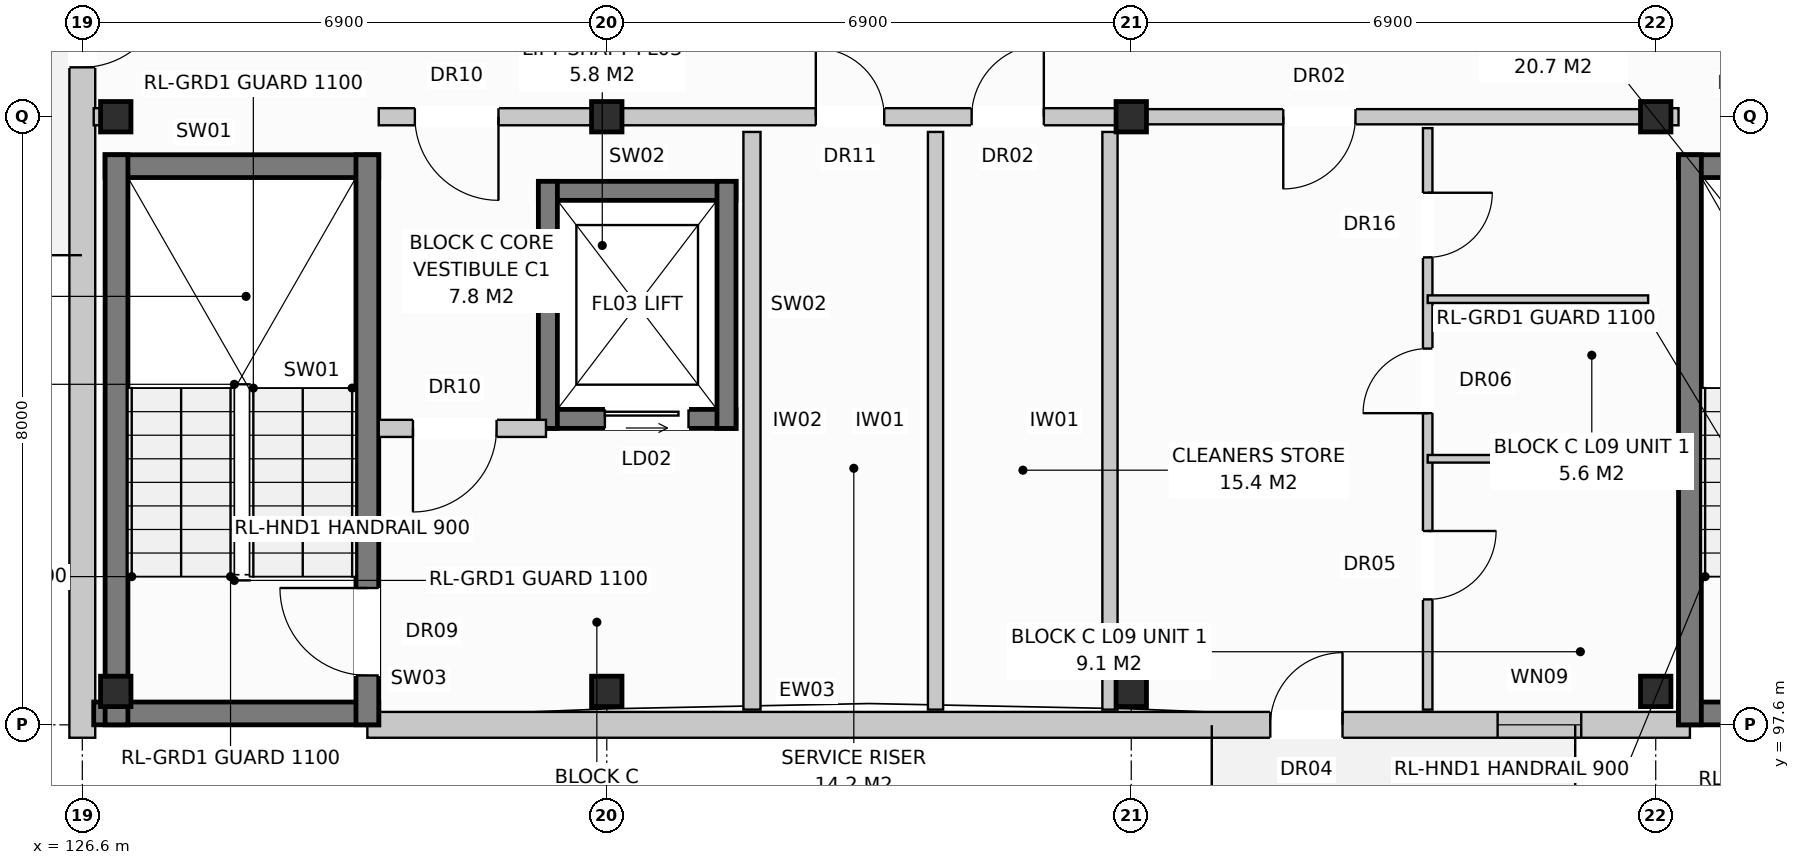
"""IFC4 building model, lengths in metres.
Left out: names, types, materials, properties, quantities, classifications, styles, units other than length and angle.
Written with IfcOpenShell. Run it as: python <this file> out.ifc"""

import sys

from ifc_helpers import new_model, si_unit, direction, frame, frame_2d, origin, origin_with_axes, origin_2d, place, context, subcontext, project, spatial, rectangle, extrude, element, fill, save


model = new_model("IFC4")
c1 = context("Model", 3, precision=1e-05, world=origin(), true_north=direction((0.0, 1.0)))
c2 = subcontext(c1, "Body", "Model", "MODEL_VIEW")
j1 = project(units=[si_unit("LENGTHUNIT", "METRE"), si_unit("PLANEANGLEUNIT", "RADIAN")], contexts=[c1])
p1 = place(None, origin())
s1 = spatial("IfcSite", under=j1, at=p1, CompositionType="ELEMENT")
p2 = place(p1, origin())
s2 = spatial("IfcBuilding", under=s1, at=p2, CompositionType="ELEMENT")
p3 = place(p2, frame((0.0, 0.0, 30.4)))
s3 = spatial("IfcBuildingStorey", under=s2, at=p3, CompositionType="ELEMENT", Elevation=30.4)
for number, where, z_axis, x_axis in (
    (1, (127.04, 98.04, 0.0), (0.0, 0.0, 1.0), (1.0, 0.0, 0.0)),
    (2, (127.04, 105.6, 0.0), (0.0, 0.0, 1.0), (1.0, 0.0, 0.0)),
    (3, (133.5, 98.04, 0.0), (0.0, 0.0, 1.0), (1.0, 0.0, 0.0)),
    (4, (133.5, 105.6, 0.0), (0.0, 0.0, 1.0), (1.0, 0.0, 0.0)),
    (5, (140.4, 98.04, 0.0), (0.0, 0.0, 1.0), (1.0, 0.0, 0.0)),
    (6, (140.4, 105.6, 0.0), (0.0, 0.0, 1.0), (1.0, 0.0, 0.0)),
    (7, (147.3, 98.04, 0.0), (0.0, 0.0, 1.0), (1.0, 0.0, 0.0)),
    (8, (147.3, 105.6, 0.0), (0.0, 0.0, 1.0), (1.0, 0.0, 0.0)),
):
    element("IfcColumn", number, at=place(p3, frame(where, z_axis=z_axis, x_axis=x_axis)), inside=s3, PredefinedType="COLUMN", context=c2, shape_type="SweptSolid", body=[
        extrude(rectangle(XDim=0.4, YDim=0.4, at=origin_2d()), origin(), (0.0, 0.0, 1.0), 3.2),
    ])
p4 = place(p3, frame((130.35, 97.6, 0.0), z_axis=(0.0, 0.0, 1.0), x_axis=(1.0, 0.0, 0.0)))
e9 = element("IfcWall", 9, at=p4, inside=s3, PredefinedType="STANDARD", context=c2, shape_type="SweptSolid", body=[
    extrude(rectangle(XDim=17.4, YDim=0.34, at=frame_2d((8.7, 0.0))), origin(), (0.0, 0.0, 1.0), 2.96),
])
p5 = place(p4, frame((11.879, 0.0, 0.0)))
e10 = element("IfcOpeningElement", 10, at=p5, cuts=e9, PredefinedType="OPENING", context=c2, shape_type="SweptSolid", body=[
    extrude(rectangle(XDim=0.95, YDim=2.1, at=frame_2d((0.475, 1.05))), frame((0.0, 0.182, 0.0), z_axis=(0.0, -1.0, 0.0), x_axis=(1.0, 0.0, 0.0)), (0.0, 0.0, 1.0), 0.364),
])
p6 = place(p4, frame((14.87, 0.0, 0.72)))
e11 = element("IfcOpeningElement", 11, at=p6, cuts=e9, PredefinedType="OPENING", context=c2, shape_type="SweptSolid", body=[
    extrude(rectangle(XDim=1.1, YDim=1.5, at=frame_2d((0.55, 0.75))), frame((0.0, 0.182, 0.0), z_axis=(0.0, -1.0, 0.0), x_axis=(1.0, 0.0, 0.0)), (0.0, 0.0, 1.0), 0.364),
])
p7 = place(p3, frame((126.6, 97.43, 0.0), z_axis=(0.0, 0.0, 1.0), x_axis=(0.0, 1.0, 0.0)))
e12 = element("IfcWall", 12, at=p7, inside=s3, PredefinedType="STANDARD", context=c2, shape_type="SweptSolid", body=[
    extrude(rectangle(XDim=18.74, YDim=0.34, at=frame_2d((9.37, 0.0))), origin(), (0.0, 0.0, 1.0), 2.96),
])
p8 = place(p7, frame((8.82, 0.0, 0.0)))
e13 = element("IfcOpeningElement", 13, at=p8, cuts=e12, PredefinedType="OPENING", context=c2, shape_type="SweptSolid", body=[
    extrude(rectangle(XDim=1.1, YDim=2.1, at=frame_2d((0.55, 1.05))), frame((0.0, 0.182, 0.0), z_axis=(0.0, -1.0, 0.0), x_axis=(1.0, 0.0, 0.0)), (0.0, 0.0, 1.0), 0.364),
])
p9 = place(p7, frame((15.92, 0.0, 0.72)))
e14 = element("IfcOpeningElement", 14, at=p9, cuts=e12, PredefinedType="OPENING", context=c2, shape_type="SweptSolid", body=[
    extrude(rectangle(XDim=1.1, YDim=1.5, at=frame_2d((0.55, 0.75))), frame((0.0, 0.182, 0.0), z_axis=(0.0, -1.0, 0.0), x_axis=(1.0, 0.0, 0.0)), (0.0, 0.0, 1.0), 0.364),
])
p10 = place(p3, frame((126.75, 97.75, 0.0), z_axis=(0.0, 0.0, 1.0), x_axis=(1.0, 0.0, 0.0)))
e15 = element("IfcWall", 15, at=p10, inside=s3, PredefinedType="SHEAR", context=c2, shape_type="SweptSolid", body=[
    extrude(rectangle(XDim=3.75, YDim=0.3, at=frame_2d((1.875, 0.0))), origin(), (0.0, 0.0, 1.0), 2.96),
])
p11 = place(p3, frame((126.9, 104.95, 0.0), z_axis=(0.0, 0.0, 1.0), x_axis=(1.0, 0.0, 0.0)))
e16 = element("IfcWall", 16, at=p11, inside=s3, PredefinedType="SHEAR", context=c2, shape_type="SweptSolid", body=[
    extrude(rectangle(XDim=3.6, YDim=0.3, at=frame_2d((1.8, 0.0))), origin(), (0.0, 0.0, 1.0), 2.96),
])
p12 = place(p3, frame((127.05, 97.6, 0.0), z_axis=(0.0, 0.0, 1.0), x_axis=(0.0, 1.0, 0.0)))
e17 = element("IfcWall", 17, at=p12, inside=s3, PredefinedType="SHEAR", context=c2, shape_type="SweptSolid", body=[
    extrude(rectangle(XDim=7.5, YDim=0.3, at=frame_2d((3.75, 0.0))), origin(), (0.0, 0.0, 1.0), 2.96),
])
p13 = place(p3, frame((130.35, 97.6, 0.0), z_axis=(0.0, 0.0, 1.0), x_axis=(0.0, 1.0, 0.0)))
e18 = element("IfcWall", 18, at=p13, inside=s3, PredefinedType="SHEAR", context=c2, shape_type="SweptSolid", body=[
    extrude(rectangle(XDim=7.5, YDim=0.3, at=frame_2d((3.75, 0.0))), origin(), (0.0, 0.0, 1.0), 2.96),
])
p14 = place(p13, frame((0.65, 0.0, 0.0)))
e19 = element("IfcOpeningElement", 19, at=p14, cuts=e18, PredefinedType="OPENING", context=c2, shape_type="SweptSolid", body=[
    extrude(rectangle(XDim=1.15, YDim=2.15, at=frame_2d((0.575, 1.075))), frame((0.0, 0.162, 0.0), z_axis=(0.0, -1.0, 0.0), x_axis=(1.0, 0.0, 0.0)), (0.0, 0.0, 1.0), 0.324),
])
p15 = place(p3, frame((132.6, 101.625, 0.0), z_axis=(0.0, 0.0, 1.0), x_axis=(1.0, 0.0, 0.0)))
e20 = element("IfcWall", 20, at=p15, inside=s3, PredefinedType="SHEAR", context=c2, shape_type="SweptSolid", body=[
    extrude(rectangle(XDim=2.6, YDim=0.25, at=frame_2d((1.3, 0.0))), origin(), (0.0, 0.0, 1.0), 2.96),
])
p16 = place(p15, frame((0.875, 0.0, 0.0)))
e21 = element("IfcOpeningElement", 21, at=p16, cuts=e20, PredefinedType="OPENING", context=c2, shape_type="SweptSolid", body=[
    extrude(rectangle(XDim=1.1, YDim=2.1, at=frame_2d((0.55, 1.05))), frame((0.0, 0.137, 0.0), z_axis=(0.0, -1.0, 0.0), x_axis=(1.0, 0.0, 0.0)), (0.0, 0.0, 1.0), 0.274),
])
p17 = place(p3, frame((132.6, 104.625, 0.0), z_axis=(0.0, 0.0, 1.0), x_axis=(1.0, 0.0, 0.0)))
e22 = element("IfcWall", 22, at=p17, inside=s3, PredefinedType="SHEAR", context=c2, shape_type="SweptSolid", body=[
    extrude(rectangle(XDim=2.6, YDim=0.25, at=frame_2d((1.3, 0.0))), origin(), (0.0, 0.0, 1.0), 2.96),
])
for number, where, z_axis, x_axis in (
    (23, (132.725, 101.5, 0.0), (0.0, 0.0, 1.0), (0.0, 1.0, 0.0)),
    (24, (135.075, 101.5, 0.0), (0.0, 0.0, 1.0), (0.0, 1.0, 0.0)),
):
    element("IfcWall", number, at=place(p3, frame(where, z_axis=z_axis, x_axis=x_axis)), inside=s3, PredefinedType="SHEAR", context=c2, shape_type="SweptSolid", body=[
        extrude(rectangle(XDim=3.25, YDim=0.25, at=frame_2d((1.625, 0.0))), origin(), (0.0, 0.0, 1.0), 2.96),
    ])
p18 = place(p3, frame((135.41, 97.8, 0.0), z_axis=(0.0, 0.0, 1.0), x_axis=(0.0, 1.0, 0.0)))
e25 = element("IfcWall", 25, at=p18, inside=s3, PredefinedType="PARTITIONING", context=c2, shape_type="SweptSolid", body=[
    extrude(rectangle(XDim=7.6, YDim=0.225, at=frame_2d((3.8, 0.0))), origin(), (0.0, 0.0, 1.0), 2.96),
])
p19 = place(p3, frame((130.5, 101.5, 0.0), z_axis=(0.0, 0.0, 1.0), x_axis=(1.0, 0.0, 0.0)))
e26 = element("IfcWall", 26, at=p19, inside=s3, PredefinedType="PARTITIONING", context=c2, shape_type="SweptSolid", body=[
    extrude(rectangle(XDim=2.2, YDim=0.225, at=frame_2d((1.1, 0.0))), origin(), (0.0, 0.0, 1.0), 2.96),
])
p20 = place(p19, frame((0.45, 0.0, 0.0)))
e27 = element("IfcOpeningElement", 27, at=p20, cuts=e26, PredefinedType="OPENING", context=c2, shape_type="SweptSolid", body=[
    extrude(rectangle(XDim=1.1, YDim=2.15, at=frame_2d((0.55, 1.075))), frame((0.0, 0.125, 0.0), z_axis=(0.0, -1.0, 0.0), x_axis=(1.0, 0.0, 0.0)), (0.0, 0.0, 1.0), 0.249),
])
p21 = place(p3, frame((126.75, 105.6, 0.0), z_axis=(0.0, 0.0, 1.0), x_axis=(1.0, 0.0, 0.0)))
e28 = element("IfcWall", 28, at=p21, inside=s3, PredefinedType="PARTITIONING", context=c2, shape_type="SweptSolid", body=[
    extrude(rectangle(XDim=0.15, YDim=0.225, at=frame_2d((0.075, 0.0))), origin(), (0.0, 0.0, 1.0), 2.96),
])
for number, where, z_axis, x_axis in (
    (29, (137.825, 97.8, 0.0), (0.0, 0.0, 1.0), (0.0, 1.0, 0.0)),
    (30, (140.12, 97.8, 0.0), (0.0, 0.0, 1.0), (0.0, 1.0, 0.0)),
):
    element("IfcWall", number, at=place(p3, frame(where, z_axis=z_axis, x_axis=x_axis)), inside=s3, PredefinedType="PARTITIONING", context=c2, shape_type="SweptSolid", body=[
        extrude(rectangle(XDim=7.6, YDim=0.2, at=frame_2d((3.8, 0.0))), origin(), (0.0, 0.0, 1.0), 2.96),
    ])
p22 = place(p3, frame((130.5, 105.6, 0.0), z_axis=(0.0, 0.0, 1.0), x_axis=(1.0, 0.0, 0.0)))
e31 = element("IfcWall", 31, at=p22, inside=s3, PredefinedType="PARTITIONING", context=c2, shape_type="SweptSolid", body=[
    extrude(rectangle(XDim=9.9, YDim=0.225, at=frame_2d((4.95, 0.0))), origin(), (0.0, 0.0, 1.0), 2.4),
])
p23 = place(p22, frame((0.475, 0.0, 0.0)))
e32 = element("IfcOpeningElement", 32, at=p23, cuts=e31, PredefinedType="OPENING", context=c2, shape_type="SweptSolid", body=[
    extrude(rectangle(XDim=1.1, YDim=2.15, at=frame_2d((0.55, 1.075))), frame((0.0, 0.125, 0.0), z_axis=(0.0, -1.0, 0.0), x_axis=(1.0, 0.0, 0.0)), (0.0, 0.0, 1.0), 0.249),
])
p24 = place(p22, frame((5.75, 0.0, 0.0)))
e33 = element("IfcOpeningElement", 33, at=p24, cuts=e31, PredefinedType="OPENING", context=c2, shape_type="SweptSolid", body=[
    extrude(rectangle(XDim=0.9, YDim=2.1, at=frame_2d((0.45, 1.05))), frame((0.0, 0.125, 0.0), z_axis=(0.0, -1.0, 0.0), x_axis=(1.0, 0.0, 0.0)), (0.0, 0.0, 1.0), 0.249),
])
p25 = place(p22, frame((7.8, 0.0, 0.0)))
e34 = element("IfcOpeningElement", 34, at=p25, cuts=e31, PredefinedType="OPENING", context=c2, shape_type="SweptSolid", body=[
    extrude(rectangle(XDim=0.95, YDim=2.15, at=frame_2d((0.475, 1.075))), frame((0.0, 0.125, 0.0), z_axis=(0.0, -1.0, 0.0), x_axis=(1.0, 0.0, 0.0)), (0.0, 0.0, 1.0), 0.249),
])
for number, where, z_axis, x_axis in (
    (35, (147.6, 97.75, 0.0), (0.0, 0.0, 1.0), (1.0, 0.0, 0.0)),
    (36, (147.6, 104.95, 0.0), (0.0, 0.0, 1.0), (1.0, 0.0, 0.0)),
):
    element("IfcWall", number, at=place(p3, frame(where, z_axis=z_axis, x_axis=x_axis)), inside=s3, PredefinedType="SHEAR", context=c2, shape_type="SweptSolid", body=[
        extrude(rectangle(XDim=3.6, YDim=0.3, at=frame_2d((1.8, 0.0))), origin(), (0.0, 0.0, 1.0), 2.96),
    ])
p26 = place(p3, frame((147.75, 97.6, 0.0), z_axis=(0.0, 0.0, 1.0), x_axis=(0.0, 1.0, 0.0)))
e37 = element("IfcWall", 37, at=p26, inside=s3, PredefinedType="SHEAR", context=c2, shape_type="SweptSolid", body=[
    extrude(rectangle(XDim=7.5, YDim=0.3, at=frame_2d((3.75, 0.0))), origin(), (0.0, 0.0, 1.0), 2.96),
])
p27 = place(p3, frame((147.3, 105.6, 0.0), z_axis=(0.0, 0.0, 1.0), x_axis=(1.0, 0.0, 0.0)))
e38 = element("IfcWall", 38, at=p27, inside=s3, PredefinedType="PARTITIONING", context=c2, shape_type="SweptSolid", body=[
    extrude(rectangle(XDim=0.3, YDim=0.225, at=frame_2d((0.15, 0.0))), origin(), (0.0, 0.0, 1.0), 2.96),
])
p28 = place(p3, frame((140.4, 105.6, 0.0), z_axis=(0.0, 0.0, 1.0), x_axis=(1.0, 0.0, 0.0)))
e39 = element("IfcWall", 39, at=p28, inside=s3, PredefinedType="PARTITIONING", context=c2, shape_type="SweptSolid", body=[
    extrude(rectangle(XDim=6.9, YDim=0.2, at=frame_2d((3.45, 0.0))), origin(), (0.0, 0.0, 1.0), 2.4),
])
p29 = place(p28, frame((2.0, 0.0, 0.0)))
e40 = element("IfcOpeningElement", 40, at=p29, cuts=e39, PredefinedType="OPENING", context=c2, shape_type="SweptSolid", body=[
    extrude(rectangle(XDim=0.95, YDim=2.15, at=frame_2d((0.475, 1.075))), frame((0.0, 0.112, 0.0), z_axis=(0.0, -1.0, 0.0), x_axis=(1.0, 0.0, 0.0)), (0.0, 0.0, 1.0), 0.224),
])
p30 = place(p3, frame((144.3, 105.45, 0.0), z_axis=(0.0, 0.0, 1.0), x_axis=(0.0, -1.0, 0.0)))
e41 = element("IfcWall", 41, at=p30, inside=s3, PredefinedType="PARTITIONING", context=c2, shape_type="SweptSolid", body=[
    extrude(rectangle(XDim=7.65, YDim=0.125, at=frame_2d((3.825, 0.0))), origin(), (0.0, 0.0, 1.0), 2.96),
])
p31 = place(p30, frame((0.85, 0.0, 0.0)))
e42 = element("IfcOpeningElement", 42, at=p31, cuts=e41, PredefinedType="OPENING", context=c2, shape_type="SweptSolid", body=[
    extrude(rectangle(XDim=0.85, YDim=2.1, at=frame_2d((0.425, 1.05))), frame((0.0, 0.074, 0.0), z_axis=(0.0, -1.0, 0.0), x_axis=(1.0, 0.0, 0.0)), (0.0, 0.0, 1.0), 0.149),
])
p32 = place(p30, frame((2.9, 0.0, 0.0)))
e43 = element("IfcOpeningElement", 43, at=p32, cuts=e41, PredefinedType="OPENING", context=c2, shape_type="SweptSolid", body=[
    extrude(rectangle(XDim=0.85, YDim=2.05, at=frame_2d((0.425, 1.025))), frame((0.0, 0.074, 0.0), z_axis=(0.0, -1.0, 0.0), x_axis=(1.0, 0.0, 0.0)), (0.0, 0.0, 1.0), 0.149),
])
p33 = place(p30, frame((5.3, 0.0, 0.0)))
e44 = element("IfcOpeningElement", 44, at=p33, cuts=e41, PredefinedType="OPENING", context=c2, shape_type="SweptSolid", body=[
    extrude(rectangle(XDim=0.9, YDim=2.1, at=frame_2d((0.45, 1.05))), frame((0.0, 0.074, 0.0), z_axis=(0.0, -1.0, 0.0), x_axis=(1.0, 0.0, 0.0)), (0.0, 0.0, 1.0), 0.149),
])
for number, where, z_axis, x_axis in (
    (45, (144.3, 103.2, 0.0), (0.0, 0.0, 1.0), (1.0, 0.0, 0.0)),
    (46, (144.3, 101.1, 0.0), (0.0, 0.0, 1.0), (1.0, 0.0, 0.0)),
):
    element("IfcWall", number, at=place(p3, frame(where, z_axis=z_axis, x_axis=x_axis)), inside=s3, PredefinedType="PARTITIONING", context=c2, shape_type="SweptSolid", body=[
        extrude(rectangle(XDim=2.9, YDim=0.1, at=frame_2d((1.45, 0.0))), origin(), (0.0, 0.0, 1.0), 2.96),
    ])
p34 = place(p5, origin_with_axes())
e47 = element("IfcDoor", 47, at=p34, inside=s3, OperationType="SINGLE_SWING_RIGHT", PredefinedType="DOOR", context=c2, shape_type="SweptSolid", body=[
    extrude(rectangle(XDim=0.95, YDim=2.1, at=frame_2d((0.475, 1.05))), frame((0.0, 0.025, 0.0), z_axis=(0.0, -1.0, 0.0), x_axis=(1.0, 0.0, 0.0)), (0.0, 0.0, 1.0), 0.05),
])
fill(e10, e47)
p35 = place(p6, origin_with_axes())
e48 = element("IfcWindow", 48, at=p35, inside=s3, PartitioningType="SINGLE_PANEL", PredefinedType="WINDOW", context=c2, shape_type="SweptSolid", body=[
    extrude(rectangle(XDim=1.1, YDim=1.5, at=frame_2d((0.55, 0.75))), frame((0.0, 0.03, 0.0), z_axis=(0.0, -1.0, 0.0), x_axis=(1.0, 0.0, 0.0)), (0.0, 0.0, 1.0), 0.06),
])
fill(e11, e48)
p36 = place(p8, frame((1.1, 0.0, 0.0), z_axis=(0.0, 0.0, 1.0), x_axis=(-1.0, 0.0, 0.0)))
e49 = element("IfcDoor", 49, at=p36, inside=s3, OperationType="SINGLE_SWING_RIGHT", PredefinedType="DOOR", context=c2, shape_type="SweptSolid", body=[
    extrude(rectangle(XDim=1.1, YDim=2.1, at=frame_2d((0.55, 1.05))), frame((0.0, 0.025, 0.0), z_axis=(0.0, -1.0, 0.0), x_axis=(1.0, 0.0, 0.0)), (0.0, 0.0, 1.0), 0.05),
])
fill(e13, e49)
p37 = place(p14, origin_with_axes())
e50 = element("IfcDoor", 50, at=p37, inside=s3, OperationType="SINGLE_SWING_RIGHT", PredefinedType="DOOR", context=c2, shape_type="SweptSolid", body=[
    extrude(rectangle(XDim=1.15, YDim=2.15, at=frame_2d((0.575, 1.075))), frame((0.0, 0.025, 0.0), z_axis=(0.0, -1.0, 0.0), x_axis=(1.0, 0.0, 0.0)), (0.0, 0.0, 1.0), 0.05),
])
fill(e19, e50)
p38 = place(p16, origin_with_axes())
e51 = element("IfcDoor", 51, at=p38, inside=s3, OperationType="SLIDING_TO_LEFT", PredefinedType="DOOR", context=c2, shape_type="SweptSolid", body=[
    extrude(rectangle(XDim=1.1, YDim=2.1, at=frame_2d((0.55, 1.05))), frame((0.0, 0.025, 0.0), z_axis=(0.0, -1.0, 0.0), x_axis=(1.0, 0.0, 0.0)), (0.0, 0.0, 1.0), 0.05),
])
fill(e21, e51)
p39 = place(p20, frame((1.1, 0.0, 0.0), z_axis=(0.0, 0.0, 1.0), x_axis=(-1.0, 0.0, 0.0)))
e52 = element("IfcDoor", 52, at=p39, inside=s3, OperationType="SINGLE_SWING_LEFT", PredefinedType="DOOR", context=c2, shape_type="SweptSolid", body=[
    extrude(rectangle(XDim=1.1, YDim=2.15, at=frame_2d((0.55, 1.075))), frame((0.0, 0.025, 0.0), z_axis=(0.0, -1.0, 0.0), x_axis=(1.0, 0.0, 0.0)), (0.0, 0.0, 1.0), 0.05),
])
fill(e27, e52)
p40 = place(p23, frame((1.1, 0.0, 0.0), z_axis=(0.0, 0.0, 1.0), x_axis=(-1.0, 0.0, 0.0)))
e53 = element("IfcDoor", 53, at=p40, inside=s3, OperationType="SINGLE_SWING_RIGHT", PredefinedType="DOOR", context=c2, shape_type="SweptSolid", body=[
    extrude(rectangle(XDim=1.1, YDim=2.15, at=frame_2d((0.55, 1.075))), frame((0.0, 0.025, 0.0), z_axis=(0.0, -1.0, 0.0), x_axis=(1.0, 0.0, 0.0)), (0.0, 0.0, 1.0), 0.05),
])
fill(e32, e53)
p41 = place(p24, origin_with_axes())
e54 = element("IfcDoor", 54, at=p41, inside=s3, OperationType="SINGLE_SWING_LEFT", PredefinedType="DOOR", context=c2, shape_type="SweptSolid", body=[
    extrude(rectangle(XDim=0.9, YDim=2.1, at=frame_2d((0.45, 1.05))), frame((0.0, 0.025, 0.0), z_axis=(0.0, -1.0, 0.0), x_axis=(1.0, 0.0, 0.0)), (0.0, 0.0, 1.0), 0.05),
])
fill(e33, e54)
p42 = place(p25, origin_with_axes())
e55 = element("IfcDoor", 55, at=p42, inside=s3, OperationType="SINGLE_SWING_RIGHT", PredefinedType="DOOR", context=c2, shape_type="SweptSolid", body=[
    extrude(rectangle(XDim=0.95, YDim=2.15, at=frame_2d((0.475, 1.075))), frame((0.0, 0.025, 0.0), z_axis=(0.0, -1.0, 0.0), x_axis=(1.0, 0.0, 0.0)), (0.0, 0.0, 1.0), 0.05),
])
fill(e34, e55)
p43 = place(p29, frame((0.95, 0.0, 0.0), z_axis=(0.0, 0.0, 1.0), x_axis=(-1.0, 0.0, 0.0)))
e56 = element("IfcDoor", 56, at=p43, inside=s3, OperationType="SINGLE_SWING_LEFT", PredefinedType="DOOR", context=c2, shape_type="SweptSolid", body=[
    extrude(rectangle(XDim=0.95, YDim=2.15, at=frame_2d((0.475, 1.075))), frame((0.0, 0.025, 0.0), z_axis=(0.0, -1.0, 0.0), x_axis=(1.0, 0.0, 0.0)), (0.0, 0.0, 1.0), 0.05),
])
fill(e40, e56)
p44 = place(p31, origin_with_axes())
e57 = element("IfcDoor", 57, at=p44, inside=s3, OperationType="SINGLE_SWING_LEFT", PredefinedType="DOOR", context=c2, shape_type="SweptSolid", body=[
    extrude(rectangle(XDim=0.85, YDim=2.1, at=frame_2d((0.425, 1.05))), frame((0.0, 0.025, 0.0), z_axis=(0.0, -1.0, 0.0), x_axis=(1.0, 0.0, 0.0)), (0.0, 0.0, 1.0), 0.05),
])
fill(e42, e57)
p45 = place(p32, frame((0.85, 0.0, 0.0), z_axis=(0.0, 0.0, 1.0), x_axis=(-1.0, 0.0, 0.0)))
e58 = element("IfcDoor", 58, at=p45, inside=s3, OperationType="SINGLE_SWING_RIGHT", PredefinedType="DOOR", context=c2, shape_type="SweptSolid", body=[
    extrude(rectangle(XDim=0.85, YDim=2.05, at=frame_2d((0.425, 1.025))), frame((0.0, 0.025, 0.0), z_axis=(0.0, -1.0, 0.0), x_axis=(1.0, 0.0, 0.0)), (0.0, 0.0, 1.0), 0.05),
])
fill(e43, e58)
p46 = place(p33, origin_with_axes())
e59 = element("IfcDoor", 59, at=p46, inside=s3, OperationType="SINGLE_SWING_LEFT", PredefinedType="DOOR", context=c2, shape_type="SweptSolid", body=[
    extrude(rectangle(XDim=0.9, YDim=2.1, at=frame_2d((0.45, 1.05))), frame((0.0, 0.025, 0.0), z_axis=(0.0, -1.0, 0.0), x_axis=(1.0, 0.0, 0.0)), (0.0, 0.0, 1.0), 0.05),
])
fill(e44, e59)
save(model, sys.argv[1])
